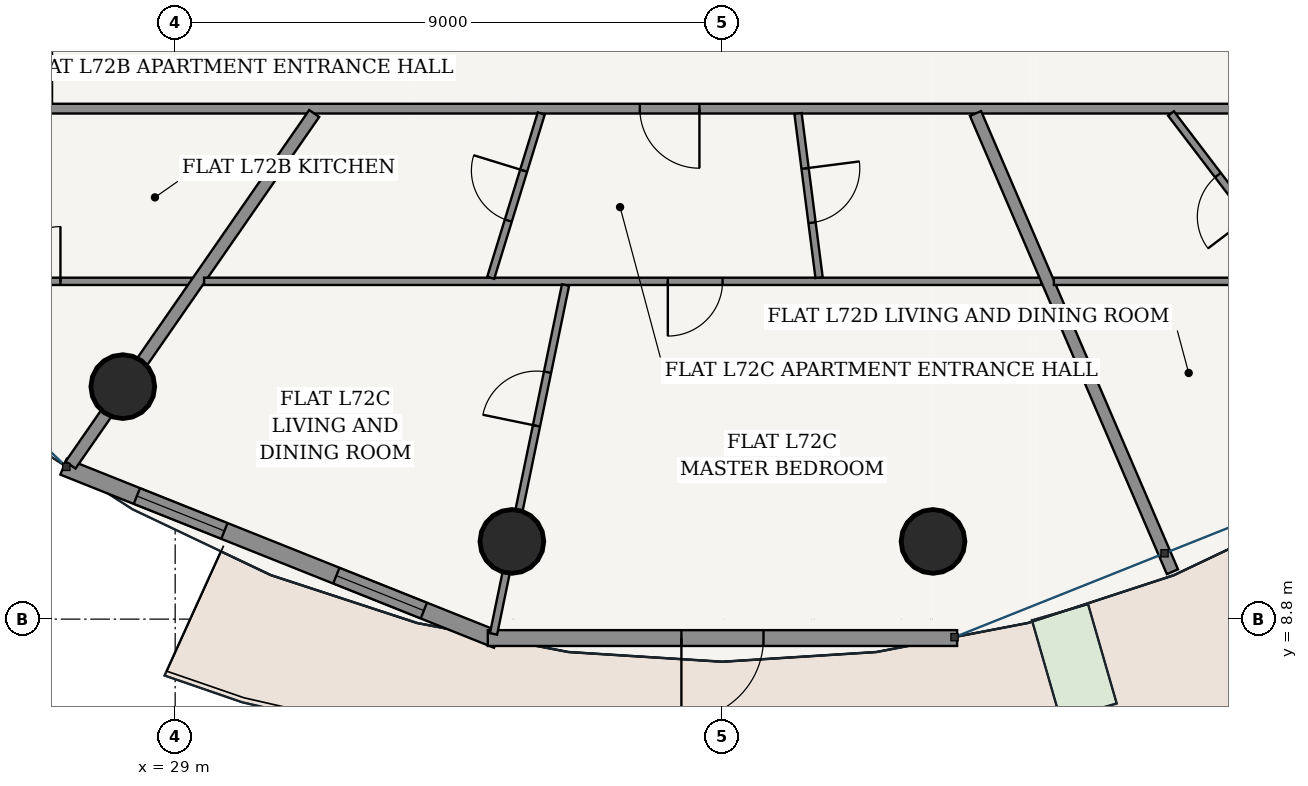
"""IFC4 building model, lengths in metres.
Left out: names, types, materials, properties, quantities, classifications, styles, units other than length and angle.
Written with IfcOpenShell. Run it as: python <this file> out.ifc"""

import sys

from ifc_helpers import new_model, si_unit, direction, frame, frame_2d, origin, origin_2d, place, context, subcontext, project, spatial, rectangle, hollow_circle, extrude, source, transform, mapped, element, fill, save


model = new_model("IFC4")
c1 = context("Model", 3, precision=1e-05, world=origin(), true_north=direction((-0.2419218956, 0.970295726276)))
c2 = subcontext(c1, "Body", "Model", "MODEL_VIEW")
j1 = project(units=[si_unit("LENGTHUNIT", "METRE"), si_unit("PLANEANGLEUNIT", "RADIAN")], contexts=[c1])
p1 = place(None, origin())
s1 = spatial("IfcSite", under=j1, at=p1, CompositionType="ELEMENT")
p2 = place(p1, origin())
s2 = spatial("IfcBuilding", under=s1, at=p2, CompositionType="ELEMENT")
p3 = place(p2, frame((0.0, 0.0, 274.45)))
s3 = spatial("IfcBuildingStorey", under=s2, at=p3, CompositionType="ELEMENT", Elevation=274.45)
for number, where, z_axis, x_axis in (
    (1, (28.139, 12.624, 0.0), (0.0, 0.0, 1.0), (1.0, 0.0, 0.0)),
    (2, (34.537, 10.078, 0.0), (0.0, 0.0, 1.0), (1.0, 0.0, 0.0)),
    (3, (41.463, 10.078, 0.0), (0.0, 0.0, 1.0), (1.0, 0.0, 0.0)),
):
    element("IfcColumn", number, at=place(p3, frame(where, z_axis=z_axis, x_axis=x_axis)), inside=s3, PredefinedType="COLUMN", context=c2, shape_type="SweptSolid", body=[
        extrude(hollow_circle(Radius=0.525, WallThickness=0.035, at=origin_2d()), origin(), (0.0, 0.0, 1.0), 3.75),
    ])
p4 = place(p3, frame((27.164, 11.306, 0.0), z_axis=(0.0, 0.0, 1.0), x_axis=(0.92871332341, -0.370798547626, 0.0)))
e4 = element("IfcWall", 4, at=p4, inside=s3, PredefinedType="SOLIDWALL", context=c2, shape_type="SweptSolid", body=[
    extrude(rectangle(XDim=7.678, YDim=0.28, at=frame_2d((3.839, 0.0))), origin(), (0.0, 0.0, 1.0), 3.49),
])
p5 = place(p4, frame((1.298, 0.0, 0.85)))
e5 = element("IfcOpeningElement", 5, at=p5, cuts=e4, PredefinedType="OPENING", context=c2, shape_type="SweptSolid", body=[
    extrude(rectangle(XDim=1.55, YDim=1.95, at=frame_2d((0.775, 0.975))), frame((0.0, 0.15, 0.0), z_axis=(0.0, -1.0, 0.0), x_axis=(1.0, 0.0, 0.0)), (0.0, 0.0, 1.0), 0.3),
])
p6 = place(p4, frame((4.83, 0.0, 0.85)))
e6 = element("IfcOpeningElement", 6, at=p6, cuts=e4, PredefinedType="OPENING", context=c2, shape_type="SweptSolid", body=[
    extrude(rectangle(XDim=1.55, YDim=1.95, at=frame_2d((0.775, 0.975))), frame((0.0, 0.15, 0.0), z_axis=(0.0, -1.0, 0.0), x_axis=(1.0, 0.0, 0.0)), (0.0, 0.0, 1.0), 0.3),
])
p7 = place(p3, frame((34.141, 8.489, 0.0), z_axis=(0.0, 0.0, 1.0), x_axis=(1.0, 0.0, 0.0)))
e7 = element("IfcWall", 7, at=p7, inside=s3, PredefinedType="SOLIDWALL", context=c2, shape_type="SweptSolid", body=[
    extrude(rectangle(XDim=7.718, YDim=0.26, at=frame_2d((3.859, 0.0))), origin(), (0.0, 0.0, 1.0), 3.49),
])
p8 = place(p7, frame((3.184, 0.0, 0.0)))
e8 = element("IfcOpeningElement", 8, at=p8, cuts=e7, PredefinedType="OPENING", context=c2, shape_type="SweptSolid", body=[
    extrude(rectangle(XDim=1.35, YDim=2.2, at=frame_2d((0.675, 1.1))), frame((0.0, 0.14, 0.0), z_axis=(0.0, -1.0, 0.0), x_axis=(1.0, 0.0, 0.0)), (0.0, 0.0, 1.0), 0.28),
])
p9 = place(p3, frame((26.895, 17.195, 0.0), z_axis=(0.0, 0.0, 1.0), x_axis=(1.0, 0.0, 0.0)))
e9 = element("IfcWall", 9, at=p9, inside=s3, PredefinedType="PARTITIONING", context=c2, shape_type="SweptSolid", body=[
    extrude(rectangle(XDim=22.21, YDim=0.16, at=frame_2d((11.105, 0.0))), origin(), (0.0, 0.0, 1.0), 3.015),
])
p10 = place(p9, frame((9.746, 0.0, 0.0)))
e10 = element("IfcOpeningElement", 10, at=p10, cuts=e9, PredefinedType="OPENING", context=c2, shape_type="SweptSolid", body=[
    extrude(rectangle(XDim=0.98, YDim=2.2, at=frame_2d((0.49, 1.1))), frame((0.0, 0.09, 0.0), z_axis=(0.0, -1.0, 0.0), x_axis=(1.0, 0.0, 0.0)), (0.0, 0.0, 1.0), 0.18),
])
p11 = place(p9, frame((20.864, 0.0, 0.0)))
e11 = element("IfcOpeningElement", 11, at=p11, cuts=e9, PredefinedType="OPENING", context=c2, shape_type="SweptSolid", body=[
    extrude(rectangle(XDim=0.98, YDim=2.2, at=frame_2d((0.49, 1.1))), frame((0.0, 0.09, 0.0), z_axis=(0.0, -1.0, 0.0), x_axis=(1.0, 0.0, 0.0)), (0.0, 0.0, 1.0), 0.18),
])
p12 = place(p3, frame((26.895, 17.275, 0.0), z_axis=(0.0, 0.0, 1.0), x_axis=(0.0, 1.0, 0.0)))
e12 = element("IfcWall", 12, at=p12, inside=s3, PredefinedType="PARTITIONING", context=c2, shape_type="SweptSolid", body=[
    extrude(rectangle(XDim=13.925, YDim=0.16, at=frame_2d((6.962, 0.0))), origin(), (0.0, 0.0, 1.0), 3.015),
])
p13 = place(p12, frame((2.735, 0.0, 0.0)))
e13 = element("IfcOpeningElement", 13, at=p13, cuts=e12, PredefinedType="OPENING", context=c2, shape_type="SweptSolid", body=[
    extrude(rectangle(XDim=0.98, YDim=2.2, at=frame_2d((0.49, 1.1))), frame((0.0, 0.09, 0.0), z_axis=(0.0, -1.0, 0.0), x_axis=(1.0, 0.0, 0.0)), (0.0, 0.0, 1.0), 0.18),
])
p14 = place(p3, frame((29.271, 14.355, 0.0), z_axis=(0.0, 0.0, 1.0), x_axis=(-1.0, 0.0, 0.0)))
e14 = element("IfcWall", 14, at=p14, inside=s3, PredefinedType="PARTITIONING", context=c2, shape_type="SweptSolid", body=[
    extrude(rectangle(XDim=5.216, YDim=0.12, at=frame_2d((2.608, 0.0))), origin(), (0.0, 0.0, 1.0), 3.015),
])
p15 = place(p14, frame((2.158, 0.0, 0.0)))
e15 = element("IfcOpeningElement", 15, at=p15, cuts=e14, PredefinedType="OPENING", context=c2, shape_type="SweptSolid", body=[
    extrude(rectangle(XDim=0.9, YDim=2.15, at=frame_2d((0.45, 1.075))), frame((0.0, 0.07, 0.0), z_axis=(0.0, -1.0, 0.0), x_axis=(1.0, 0.0, 0.0)), (0.0, 0.0, 1.0), 0.14),
])
p16 = place(p3, frame((31.286, 17.115, 0.0), z_axis=(0.0, 0.0, 1.0), x_axis=(-0.569682734556, -0.821864698079, 0.0)))
e16 = element("IfcWall", 16, at=p16, inside=s3, PredefinedType="PARTITIONING", context=c2, shape_type="SweptSolid", body=[
    extrude(rectangle(XDim=7.034, YDim=0.2, at=frame_2d((3.517, 0.0))), origin(), (0.0, 0.0, 1.0), 3.015),
])
p17 = place(p3, frame((43.246, 14.355, 0.0), z_axis=(0.0, 0.0, 1.0), x_axis=(-1.0, 0.0, 0.0)))
e17 = element("IfcWall", 17, at=p17, inside=s3, PredefinedType="PARTITIONING", context=c2, shape_type="SweptSolid", body=[
    extrude(rectangle(XDim=13.771, YDim=0.12, at=frame_2d((6.885, 0.0))), origin(), (0.0, 0.0, 1.0), 3.015),
])
p18 = place(p17, frame((5.244, 0.0, 0.0)))
e18 = element("IfcOpeningElement", 18, at=p18, cuts=e17, PredefinedType="OPENING", context=c2, shape_type="SweptSolid", body=[
    extrude(rectangle(XDim=0.9, YDim=2.15, at=frame_2d((0.45, 1.075))), frame((0.0, 0.07, 0.0), z_axis=(0.0, -1.0, 0.0), x_axis=(1.0, 0.0, 0.0)), (0.0, 0.0, 1.0), 0.14),
])
p19 = place(p3, frame((35.419, 14.294, 0.0), z_axis=(0.0, 0.0, 1.0), x_axis=(-0.202123253109, -0.979360092383, 0.0)))
e19 = element("IfcWall", 19, at=p19, inside=s3, PredefinedType="PARTITIONING", context=c2, shape_type="SweptSolid", body=[
    extrude(rectangle(XDim=5.858, YDim=0.12, at=frame_2d((2.929, 0.0))), origin(), (0.0, 0.0, 1.0), 3.015),
])
p20 = place(p19, frame((1.464, 0.0, 0.0)))
e20 = element("IfcOpeningElement", 20, at=p20, cuts=e19, PredefinedType="OPENING", context=c2, shape_type="SweptSolid", body=[
    extrude(rectangle(XDim=0.9, YDim=2.15, at=frame_2d((0.45, 1.075))), frame((0.0, 0.07, 0.0), z_axis=(0.0, -1.0, 0.0), x_axis=(1.0, 0.0, 0.0)), (0.0, 0.0, 1.0), 0.14),
])
p21 = place(p3, frame((35.02, 17.115, 0.0), z_axis=(0.0, 0.0, 1.0), x_axis=(-0.294110134522, -0.955771535866, 0.0)))
e21 = element("IfcWall", 21, at=p21, inside=s3, PredefinedType="PARTITIONING", context=c2, shape_type="SweptSolid", body=[
    extrude(rectangle(XDim=2.826, YDim=0.12, at=frame_2d((1.413, 0.0))), origin(), (0.0, 0.0, 1.0), 3.209),
])
p22 = place(p21, frame((0.983, 0.0, 0.0)))
e22 = element("IfcOpeningElement", 22, at=p22, cuts=e21, PredefinedType="OPENING", context=c2, shape_type="SweptSolid", body=[
    extrude(rectangle(XDim=0.86, YDim=2.15, at=frame_2d((0.43, 1.075))), frame((0.0, 0.07, 0.0), z_axis=(0.0, -1.0, 0.0), x_axis=(1.0, 0.0, 0.0)), (0.0, 0.0, 1.0), 0.14),
])
p23 = place(p3, frame((39.243, 17.115, 0.0), z_axis=(0.0, 0.0, 1.0), x_axis=(0.127336357758, -0.991859592882, 0.0)))
e23 = element("IfcWall", 23, at=p23, inside=s3, PredefinedType="PARTITIONING", context=c2, shape_type="SweptSolid", body=[
    extrude(rectangle(XDim=2.721, YDim=0.12, at=frame_2d((1.36, 0.0))), origin(), (0.0, 0.0, 1.0), 3.209),
])
p24 = place(p23, frame((0.91, 0.0, 0.0)))
e24 = element("IfcOpeningElement", 24, at=p24, cuts=e23, PredefinedType="OPENING", context=c2, shape_type="SweptSolid", body=[
    extrude(rectangle(XDim=0.9, YDim=2.15, at=frame_2d((0.45, 1.075))), frame((0.0, 0.07, 0.0), z_axis=(0.0, -1.0, 0.0), x_axis=(1.0, 0.0, 0.0)), (0.0, 0.0, 1.0), 0.14),
])
p25 = place(p3, frame((42.162, 17.115, 0.0), z_axis=(0.0, 0.0, 1.0), x_axis=(0.394795631127, -0.918768964236, 0.0)))
e25 = element("IfcWall", 25, at=p25, inside=s3, PredefinedType="PARTITIONING", context=c2, shape_type="SweptSolid", body=[
    extrude(rectangle(XDim=8.202, YDim=0.2, at=frame_2d((4.101, 0.0))), origin(), (0.0, 0.0, 1.0), 3.121),
])
p26 = place(p3, frame((51.945, 14.355, 0.0), z_axis=(0.0, 0.0, 1.0), x_axis=(-1.0, 0.0, 0.0)))
e26 = element("IfcWall", 26, at=p26, inside=s3, PredefinedType="PARTITIONING", context=c2, shape_type="SweptSolid", body=[
    extrude(rectangle(XDim=8.495, YDim=0.12, at=frame_2d((4.248, 0.0))), origin(), (0.0, 0.0, 1.0), 3.015),
])
p27 = place(p26, frame((2.164, 0.0, 0.0)))
e27 = element("IfcOpeningElement", 27, at=p27, cuts=e26, PredefinedType="OPENING", context=c2, shape_type="SweptSolid", body=[
    extrude(rectangle(XDim=0.9, YDim=2.15, at=frame_2d((0.45, 1.075))), frame((0.0, 0.07, 0.0), z_axis=(0.0, -1.0, 0.0), x_axis=(1.0, 0.0, 0.0)), (0.0, 0.0, 1.0), 0.14),
])
p28 = place(p3, frame((45.377, 17.115, 0.0), z_axis=(0.0, 0.0, 1.0), x_axis=(0.60588776962, -0.795550130806, 0.0)))
e28 = element("IfcWall", 28, at=p28, inside=s3, PredefinedType="PARTITIONING", context=c2, shape_type="SweptSolid", body=[
    extrude(rectangle(XDim=3.407, YDim=0.12, at=frame_2d((1.704, 0.0))), origin(), (0.0, 0.0, 1.0), 3.209),
])
p29 = place(p28, frame((1.274, 0.0, 0.0)))
e29 = element("IfcOpeningElement", 29, at=p29, cuts=e28, PredefinedType="OPENING", context=c2, shape_type="SweptSolid", body=[
    extrude(rectangle(XDim=0.86, YDim=2.15, at=frame_2d((0.43, 1.075))), frame((0.0, 0.07, 0.0), z_axis=(0.0, -1.0, 0.0), x_axis=(1.0, 0.0, 0.0)), (0.0, 0.0, 1.0), 0.14),
])
m1 = source(origin(), c2, "Body", "SweptSolid", [
    extrude(rectangle(XDim=1.55, YDim=1.95, at=frame_2d((0.775, 0.975))), frame((0.0, 0.03, 0.0), z_axis=(0.0, -1.0, 0.0), x_axis=(1.0, 0.0, 0.0)), (0.0, 0.0, 1.0), 0.06),
])
p30 = place(p5, origin())
e30 = element("IfcWindow", 30, at=p30, inside=s3, PartitioningType="SINGLE_PANEL", PredefinedType="WINDOW", context=c2, shape_type="MappedRepresentation", body=[
    mapped(m1, transform((0.0, 0.0, 0.0), scale=1.0)),
])
fill(e5, e30)
p31 = place(p6, origin())
e31 = element("IfcWindow", 31, at=p31, inside=s3, PartitioningType="SINGLE_PANEL", PredefinedType="WINDOW", context=c2, shape_type="MappedRepresentation", body=[
    mapped(m1, transform((0.0, 0.0, 0.0), scale=1.0)),
])
fill(e6, e31)
m2 = source(origin(), c2, "Body", "SweptSolid", [
    extrude(rectangle(XDim=1.35, YDim=2.2, at=frame_2d((0.675, 1.1))), frame((0.0, 0.025, 0.0), z_axis=(0.0, -1.0, 0.0), x_axis=(1.0, 0.0, 0.0)), (0.0, 0.0, 1.0), 0.05),
])
p32 = place(p8, frame((1.35, 0.0, 0.0), z_axis=(0.0, 0.0, 1.0), x_axis=(-1.0, 0.0, 0.0)))
e32 = element("IfcDoor", 32, at=p32, inside=s3, OperationType="SINGLE_SWING_RIGHT", PredefinedType="DOOR", context=c2, shape_type="MappedRepresentation", body=[
    mapped(m2, transform((0.0, 0.0, 0.0), scale=1.0)),
])
fill(e8, e32)
m3 = source(origin(), c2, "Body", "SweptSolid", [
    extrude(rectangle(XDim=0.9, YDim=2.15, at=frame_2d((0.45, 1.075))), frame((0.0, 0.025, 0.0), z_axis=(0.0, -1.0, 0.0), x_axis=(1.0, 0.0, 0.0)), (0.0, 0.0, 1.0), 0.05),
])
p33 = place(p15, frame((0.9, 0.0, 0.0), z_axis=(0.0, 0.0, 1.0), x_axis=(-1.0, 0.0, 0.0)))
e33 = element("IfcDoor", 33, at=p33, inside=s3, OperationType="SINGLE_SWING_RIGHT", PredefinedType="DOOR", context=c2, shape_type="MappedRepresentation", body=[
    mapped(m3, transform((0.0, 0.0, 0.0), scale=1.0)),
])
fill(e15, e33)
m4 = source(origin(), c2, "Body", "SweptSolid", [
    extrude(rectangle(XDim=0.98, YDim=2.2, at=frame_2d((0.49, 1.1))), frame((0.0, 0.025, 0.0), z_axis=(0.0, -1.0, 0.0), x_axis=(1.0, 0.0, 0.0)), (0.0, 0.0, 1.0), 0.05),
])
p34 = place(p10, frame((0.98, 0.0, 0.0), z_axis=(0.0, 0.0, 1.0), x_axis=(-1.0, 0.0, 0.0)))
e34 = element("IfcDoor", 34, at=p34, inside=s3, OperationType="SINGLE_SWING_LEFT", PredefinedType="DOOR", context=c2, shape_type="MappedRepresentation", body=[
    mapped(m4, transform((0.0, 0.0, 0.0), scale=1.0)),
])
fill(e10, e34)
m5 = source(origin(), c2, "Body", "SweptSolid", [
    extrude(rectangle(XDim=0.86, YDim=2.15, at=frame_2d((0.43, 1.075))), frame((0.0, 0.025, 0.0), z_axis=(0.0, -1.0, 0.0), x_axis=(1.0, 0.0, 0.0)), (0.0, 0.0, 1.0), 0.05),
])
p35 = place(p22, frame((0.86, 0.0, 0.0), z_axis=(0.0, 0.0, 1.0), x_axis=(-1.0, 0.0, 0.0)))
e35 = element("IfcDoor", 35, at=p35, inside=s3, OperationType="SINGLE_SWING_RIGHT", PredefinedType="DOOR", context=c2, shape_type="MappedRepresentation", body=[
    mapped(m5, transform((0.0, 0.0, 0.0), scale=1.0)),
])
fill(e22, e35)
p36 = place(p24, origin())
e36 = element("IfcDoor", 36, at=p36, inside=s3, OperationType="SINGLE_SWING_LEFT", PredefinedType="DOOR", context=c2, shape_type="MappedRepresentation", body=[
    mapped(m3, transform((0.0, 0.0, 0.0), scale=1.0)),
])
fill(e24, e36)
p37 = place(p18, origin())
e37 = element("IfcDoor", 37, at=p37, inside=s3, OperationType="SINGLE_SWING_RIGHT", PredefinedType="DOOR", context=c2, shape_type="MappedRepresentation", body=[
    mapped(m3, transform((0.0, 0.0, 0.0), scale=1.0)),
])
fill(e18, e37)
p38 = place(p20, frame((0.9, 0.0, 0.0), z_axis=(0.0, 0.0, 1.0), x_axis=(-1.0, 0.0, 0.0)))
e38 = element("IfcDoor", 38, at=p38, inside=s3, OperationType="SINGLE_SWING_LEFT", PredefinedType="DOOR", context=c2, shape_type="MappedRepresentation", body=[
    mapped(m3, transform((0.0, 0.0, 0.0), scale=1.0)),
])
fill(e20, e38)
p39 = place(p29, frame((0.86, 0.0, 0.0), z_axis=(0.0, 0.0, 1.0), x_axis=(-1.0, 0.0, 0.0)))
e39 = element("IfcDoor", 39, at=p39, inside=s3, OperationType="SINGLE_SWING_LEFT", PredefinedType="DOOR", context=c2, shape_type="MappedRepresentation", body=[
    mapped(m5, transform((0.0, 0.0, 0.0), scale=1.0)),
])
fill(e29, e39)
save(model, sys.argv[1])
